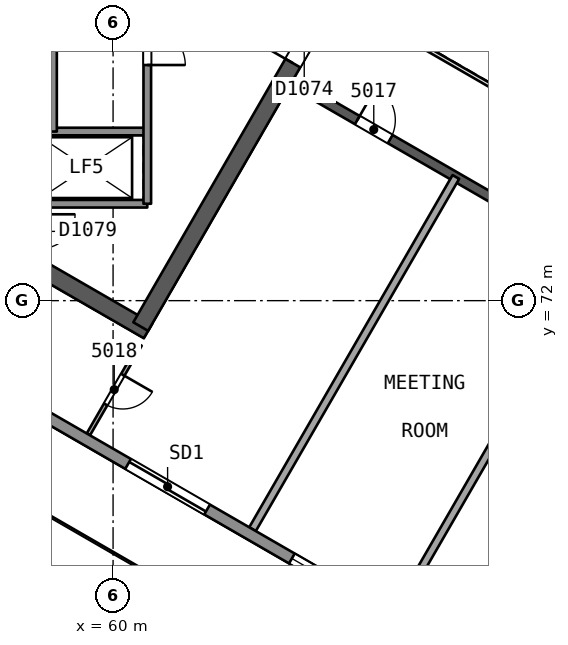
"""IFC4 building model, lengths in metres.
Left out: names, types, materials, properties, quantities, classifications, styles, units other than length and angle.
Written with IfcOpenShell. Run it as: python <this file> out.ifc"""

import sys

from ifc_helpers import new_model, si_unit, direction, frame, frame_2d, origin, place, context, subcontext, project, spatial, rectangle, extrude, element, fill, save


model = new_model("IFC4")
c1 = context("Model", 3, precision=1e-05, world=origin(), true_north=direction((0.0, 1.0)))
c2 = subcontext(c1, "Body", "Model", "MODEL_VIEW")
j1 = project(units=[si_unit("LENGTHUNIT", "METRE"), si_unit("PLANEANGLEUNIT", "RADIAN")], contexts=[c1])
p1 = place(None, origin())
s1 = spatial("IfcSite", under=j1, at=p1, CompositionType="ELEMENT")
p2 = place(p1, origin())
s2 = spatial("IfcBuilding", under=s1, at=p2, CompositionType="ELEMENT")
p3 = place(p2, frame((0.0, 0.0, 205.8)))
s3 = spatial("IfcBuildingStorey", under=s2, at=p3, CompositionType="ELEMENT", Elevation=205.8)
p4 = place(p3, frame((48.622, 78.307, 0.0), z_axis=(0.0, 0.0, 1.0), x_axis=(0.86602701116, -0.499997215934, 0.0)))
e1 = element("IfcWall", 1, at=p4, inside=s3, PredefinedType="SHEAR", context=c2, shape_type="SweptSolid", body=[
    extrude(rectangle(XDim=14.204, YDim=0.45, at=frame_2d((7.102, 0.0))), origin(), (0.0, 0.0, 1.0), 3.7),
])
p5 = place(p3, frame((60.728, 71.318, 0.0), z_axis=(0.0, 0.0, 1.0), x_axis=(0.500012416173, 0.866018235185, 0.0)))
e2 = element("IfcWall", 2, at=p5, inside=s3, PredefinedType="SHEAR", context=c2, shape_type="SweptSolid", body=[
    extrude(rectangle(XDim=10.155, YDim=0.45, at=frame_2d((5.078, 0.0))), origin(), (0.0, 0.0, 1.0), 3.7),
])
p6 = place(p5, frame((8.005, 0.0, 0.0)))
e3 = element("IfcOpeningElement", 3, at=p6, cuts=e2, PredefinedType="OPENING", context=c2, shape_type="SweptSolid", body=[
    extrude(rectangle(XDim=1.2, YDim=2.1, at=frame_2d((0.6, 1.05))), frame((0.0, 0.235, 0.0), z_axis=(0.0, -1.0, 0.0), x_axis=(1.0, 0.0, 0.0)), (0.0, 0.0, 1.0), 0.471),
])
p7 = place(p3, frame((64.7, 77.748, 0.0), z_axis=(0.0, 0.0, 1.0), x_axis=(0.866026492143, -0.499998114903, 0.0)))
e4 = element("IfcWall", 4, at=p7, inside=s3, PredefinedType="SHEAR", context=c2, shape_type="SweptSolid", body=[
    extrude(rectangle(XDim=15.588, YDim=0.25, at=frame_2d((7.794, 0.0))), origin(), (0.0, 0.0, 1.0), 3.3),
])
p8 = place(p7, frame((1.994, 0.0, 0.0)))
e5 = element("IfcOpeningElement", 5, at=p8, cuts=e4, PredefinedType="OPENING", context=c2, shape_type="SweptSolid", body=[
    extrude(rectangle(XDim=1.0, YDim=2.1, at=frame_2d((0.5, 1.05))), frame((0.0, 0.135, 0.0), z_axis=(0.0, -1.0, 0.0), x_axis=(1.0, 0.0, 0.0)), (0.0, 0.0, 1.0), 0.271),
])
p9 = place(p7, frame((6.571, 0.0, 0.0)))
e6 = element("IfcOpeningElement", 6, at=p9, cuts=e4, PredefinedType="OPENING", context=c2, shape_type="SweptSolid", body=[
    extrude(rectangle(XDim=1.2, YDim=2.4, at=frame_2d((0.6, 1.2))), frame((0.0, 0.135, 0.0), z_axis=(0.0, -1.0, 0.0), x_axis=(1.0, 0.0, 0.0)), (0.0, 0.0, 1.0), 0.271),
])
p10 = place(p7, frame((11.971, 0.0, 0.0)))
e7 = element("IfcOpeningElement", 7, at=p10, cuts=e4, PredefinedType="OPENING", context=c2, shape_type="SweptSolid", body=[
    extrude(rectangle(XDim=1.0, YDim=2.1, at=frame_2d((0.5, 1.05))), frame((0.0, 0.135, 0.0), z_axis=(0.0, -1.0, 0.0), x_axis=(1.0, 0.0, 0.0)), (0.0, 0.0, 1.0), 0.271),
])
p11 = place(p3, frame((60.71, 70.838, 0.0), z_axis=(0.0, 0.0, 1.0), x_axis=(-0.499957886064, -0.866049716911, 0.0)))
e8 = element("IfcWall", 8, at=p11, inside=s3, PredefinedType="PARTITIONING", context=c2, shape_type="SweptSolid", body=[
    extrude(rectangle(XDim=2.723, YDim=0.1, at=frame_2d((1.361, 0.0))), origin(), (0.0, 0.0, 1.0), 3.3),
])
p12 = place(p11, frame((0.911, 0.0, 0.0)))
e9 = element("IfcOpeningElement", 9, at=p12, cuts=e8, PredefinedType="OPENING", context=c2, shape_type="SweptSolid", body=[
    extrude(rectangle(XDim=0.9, YDim=2.1, at=frame_2d((0.45, 1.05))), frame((0.0, 0.061, 0.0), z_axis=(0.0, -1.0, 0.0), x_axis=(1.0, 0.0, 0.0)), (0.0, 0.0, 1.0), 0.121),
])
for number, where, z_axis, x_axis in (
    (10, (63.669, 65.986, 0.0), (0.0, 0.0, 1.0), (0.5, 0.866, 0.0)),
    (11, (67.449, 63.804, 0.0), (0.0, 0.0, 1.0), (0.5, 0.866, 0.0)),
):
    element("IfcWall", number, at=place(p3, frame(where, z_axis=z_axis, x_axis=x_axis)), inside=s3, PredefinedType="PARTITIONING", context=c2, shape_type="SweptSolid", body=[
        extrude(rectangle(XDim=10.702, YDim=0.2, at=frame_2d((5.351, 0.0))), origin(), (0.0, 0.0, 1.0), 3.3),
    ])
p13 = place(p3, frame((88.377, 51.549, 0.0), z_axis=(0.0, 0.0, 1.0), x_axis=(-0.866024917385, 0.500000842468, 0.0)))
e12 = element("IfcWall", 12, at=p13, inside=s3, PredefinedType="SOLIDWALL", context=c2, shape_type="SweptSolid", body=[
    extrude(rectangle(XDim=51.621, YDim=0.3, at=frame_2d((25.811, 0.0))), origin(), (0.0, 0.0, 1.0), 3.3),
])
p14 = place(p13, frame((29.911, 0.0, 0.0)))
e13 = element("IfcOpeningElement", 13, at=p14, cuts=e12, PredefinedType="OPENING", context=c2, shape_type="SweptSolid", body=[
    extrude(rectangle(XDim=2.4, YDim=2.4, at=frame_2d((1.2, 1.2))), frame((0.0, 0.161, 0.0), z_axis=(0.0, -1.0, 0.0), x_axis=(1.0, 0.0, 0.0)), (0.0, 0.0, 1.0), 0.321),
])
p15 = place(p13, frame((40.147, 0.0, 0.0)))
e14 = element("IfcOpeningElement", 14, at=p15, cuts=e12, PredefinedType="OPENING", context=c2, shape_type="SweptSolid", body=[
    extrude(rectangle(XDim=2.4, YDim=2.4, at=frame_2d((1.2, 1.2))), frame((0.0, 0.161, 0.0), z_axis=(0.0, -1.0, 0.0), x_axis=(1.0, 0.0, 0.0)), (0.0, 0.0, 1.0), 0.321),
])
p16 = place(p13, frame((19.934, 0.0, 0.0)))
e15 = element("IfcOpeningElement", 15, at=p16, cuts=e12, PredefinedType="OPENING", context=c2, shape_type="SweptSolid", body=[
    extrude(rectangle(XDim=2.4, YDim=2.4, at=frame_2d((1.2, 1.2))), frame((0.0, 0.161, 0.0), z_axis=(0.0, -1.0, 0.0), x_axis=(1.0, 0.0, 0.0)), (0.0, 0.0, 1.0), 0.321),
])
p17 = place(p13, frame((9.107, 0.0, 0.0)))
e16 = element("IfcOpeningElement", 16, at=p17, cuts=e12, PredefinedType="OPENING", context=c2, shape_type="SweptSolid", body=[
    extrude(rectangle(XDim=2.4, YDim=2.4, at=frame_2d((1.2, 1.2))), frame((0.0, 0.161, 0.0), z_axis=(0.0, -1.0, 0.0), x_axis=(1.0, 0.0, 0.0)), (0.0, 0.0, 1.0), 0.321),
])
p18 = place(p13, frame((25.534, 0.0, 0.9)))
e17 = element("IfcOpeningElement", 17, at=p18, cuts=e12, PredefinedType="OPENING", context=c2, shape_type="SweptSolid", body=[
    extrude(rectangle(XDim=1.8, YDim=1.5, at=frame_2d((0.9, 0.75))), frame((0.0, 0.161, 0.0), z_axis=(0.0, -1.0, 0.0), x_axis=(1.0, 0.0, 0.0)), (0.0, 0.0, 1.0), 0.321),
])
p19 = place(p3, frame((58.42, 77.925, 0.0), z_axis=(0.0, 0.0, 1.0), x_axis=(-1.0, 0.0, 0.0)))
e18 = element("IfcWall", 18, at=p19, inside=s3, PredefinedType="SOLIDWALL", context=c2, shape_type="SweptSolid", body=[
    extrude(rectangle(XDim=7.7, YDim=0.2, at=frame_2d((3.85, 0.0))), origin(), (0.0, 0.0, 1.0), 3.3),
])
p20 = place(p19, frame((0.55, 0.0, 0.0)))
e19 = element("IfcOpeningElement", 19, at=p20, cuts=e18, PredefinedType="OPENING", context=c2, shape_type="SweptSolid", body=[
    extrude(rectangle(XDim=1.1, YDim=2.1, at=frame_2d((0.55, 1.05))), frame((0.0, 0.11, 0.0), z_axis=(0.0, -1.0, 0.0), x_axis=(1.0, 0.0, 0.0)), (0.0, 0.0, 1.0), 0.221),
])
for number, where, z_axis, x_axis in (
    (20, (60.9, 76.45, 0.0), (0.0, 0.0, 1.0), (-1.0, 0.0, 0.0)),
    (21, (60.9, 74.55, 0.0), (0.0, 0.0, 1.0), (-1.0, 0.0, 0.0)),
):
    element("IfcWall", number, at=place(p3, frame(where, z_axis=z_axis, x_axis=x_axis)), inside=s3, PredefinedType="SOLIDWALL", context=c2, shape_type="SweptSolid", body=[
        extrude(rectangle(XDim=3.05, YDim=0.2, at=frame_2d((1.525, 0.0))), origin(), (0.0, 0.0, 1.0), 3.3),
    ])
p21 = place(p3, frame((60.9, 85.45, 0.0), z_axis=(0.0, 0.0, 1.0), x_axis=(0.0, -1.0, 0.0)))
e22 = element("IfcWall", 22, at=p21, inside=s3, PredefinedType="SOLIDWALL", context=c2, shape_type="SweptSolid", body=[
    extrude(rectangle(XDim=10.9, YDim=0.2, at=frame_2d((5.45, 0.0))), origin(), (0.0, 0.0, 1.0), 3.3),
])
p22 = place(p21, frame((0.625, 0.0, 0.0)))
e23 = element("IfcOpeningElement", 23, at=p22, cuts=e22, PredefinedType="OPENING", context=c2, shape_type="SweptSolid", body=[
    extrude(rectangle(XDim=1.0, YDim=2.1, at=frame_2d((0.5, 1.05))), frame((0.0, 0.11, 0.0), z_axis=(0.0, -1.0, 0.0), x_axis=(1.0, 0.0, 0.0)), (0.0, 0.0, 1.0), 0.221),
])
p23 = place(p21, frame((2.875, 0.0, 0.0)))
e24 = element("IfcOpeningElement", 24, at=p23, cuts=e22, PredefinedType="OPENING", context=c2, shape_type="SweptSolid", body=[
    extrude(rectangle(XDim=1.0, YDim=2.1, at=frame_2d((0.5, 1.05))), frame((0.0, 0.11, 0.0), z_axis=(0.0, -1.0, 0.0), x_axis=(1.0, 0.0, 0.0)), (0.0, 0.0, 1.0), 0.221),
])
p24 = place(p21, frame((6.25, 0.0, 0.0)))
e25 = element("IfcOpeningElement", 25, at=p24, cuts=e22, PredefinedType="OPENING", context=c2, shape_type="SweptSolid", body=[
    extrude(rectangle(XDim=1.0, YDim=2.1, at=frame_2d((0.5, 1.05))), frame((0.0, 0.11, 0.0), z_axis=(0.0, -1.0, 0.0), x_axis=(1.0, 0.0, 0.0)), (0.0, 0.0, 1.0), 0.221),
])
p25 = place(p3, frame((58.42, 87.09, 0.0), z_axis=(0.0, 0.0, 1.0), x_axis=(0.0, -1.0, 0.0)))
e26 = element("IfcWall", 26, at=p25, inside=s3, PredefinedType="SOLIDWALL", context=c2, shape_type="SweptSolid", body=[
    extrude(rectangle(XDim=10.64, YDim=0.2, at=frame_2d((5.32, 0.0))), origin(), (0.0, 0.0, 1.0), 3.3),
])
p26 = place(p25, frame((0.37, 0.0, 0.0)))
e27 = element("IfcOpeningElement", 27, at=p26, cuts=e26, PredefinedType="OPENING", context=c2, shape_type="SweptSolid", body=[
    extrude(rectangle(XDim=0.9, YDim=2.1, at=frame_2d((0.45, 1.05))), frame((0.0, 0.11, 0.0), z_axis=(0.0, -1.0, 0.0), x_axis=(1.0, 0.0, 0.0)), (0.0, 0.0, 1.0), 0.221),
])
p27 = place(p3, frame((67.702, 78.948, 0.0), z_axis=(0.0, 0.0, 1.0), x_axis=(0.866026658274, -0.499997827154, 0.0)))
e28 = element("IfcWall", 28, at=p27, inside=s3, PredefinedType="PARTITIONING", context=c2, shape_type="SweptSolid", body=[
    extrude(rectangle(XDim=11.588, YDim=0.1, at=frame_2d((5.794, 0.0))), origin(), (0.0, 0.0, 1.0), 3.3),
])
p28 = place(p8, origin())
e29 = element("IfcDoor", 29, at=p28, inside=s3, OperationType="SINGLE_SWING_LEFT", PredefinedType="NOTDEFINED", context=c2, shape_type="SweptSolid", body=[
    extrude(rectangle(XDim=1.0, YDim=2.1, at=frame_2d((0.5, 1.05))), frame((0.0, 0.025, 0.0), z_axis=(0.0, -1.0, 0.0), x_axis=(1.0, 0.0, 0.0)), (0.0, 0.0, 1.0), 0.05),
])
fill(e5, e29)
p29 = place(p12, origin())
e30 = element("IfcDoor", 30, at=p29, inside=s3, OperationType="SINGLE_SWING_LEFT", PredefinedType="NOTDEFINED", context=c2, shape_type="SweptSolid", body=[
    extrude(rectangle(XDim=0.9, YDim=2.1, at=frame_2d((0.45, 1.05))), frame((0.0, 0.025, 0.0), z_axis=(0.0, -1.0, 0.0), x_axis=(1.0, 0.0, 0.0)), (0.0, 0.0, 1.0), 0.05),
])
fill(e9, e30)
p30 = place(p14, origin())
e31 = element("IfcDoor", 31, at=p30, inside=s3, OperationType="SLIDING_TO_LEFT", PredefinedType="NOTDEFINED", context=c2, shape_type="SweptSolid", body=[
    extrude(rectangle(XDim=2.4, YDim=2.4, at=frame_2d((1.2, 1.2))), frame((0.0, 0.025, 0.0), z_axis=(0.0, -1.0, 0.0), x_axis=(1.0, 0.0, 0.0)), (0.0, 0.0, 1.0), 0.05),
])
fill(e13, e31)
p31 = place(p18, origin())
e32 = element("IfcWindow", 32, at=p31, inside=s3, PartitioningType="SINGLE_PANEL", PredefinedType="WINDOW", context=c2, shape_type="SweptSolid", body=[
    extrude(rectangle(XDim=1.8, YDim=1.5, at=frame_2d((0.9, 0.75))), frame((0.0, 0.03, 0.0), z_axis=(0.0, -1.0, 0.0), x_axis=(1.0, 0.0, 0.0)), (0.0, 0.0, 1.0), 0.06),
])
fill(e17, e32)
p32 = place(p6, origin())
e33 = element("IfcDoor", 33, at=p32, inside=s3, OperationType="SINGLE_SWING_LEFT", PredefinedType="NOTDEFINED", context=c2, shape_type="SweptSolid", body=[
    extrude(rectangle(XDim=1.2, YDim=2.1, at=frame_2d((0.6, 1.05))), frame((0.0, 0.025, 0.0), z_axis=(0.0, -1.0, 0.0), x_axis=(1.0, 0.0, 0.0)), (0.0, 0.0, 1.0), 0.05),
])
fill(e3, e33)
p33 = place(p24, origin())
e34 = element("IfcDoor", 34, at=p33, inside=s3, OperationType="SINGLE_SWING_RIGHT", PredefinedType="NOTDEFINED", context=c2, shape_type="SweptSolid", body=[
    extrude(rectangle(XDim=1.0, YDim=2.1, at=frame_2d((0.5, 1.05))), frame((0.0, 0.025, 0.0), z_axis=(0.0, -1.0, 0.0), x_axis=(1.0, 0.0, 0.0)), (0.0, 0.0, 1.0), 0.05),
])
fill(e25, e34)
save(model, sys.argv[1])
